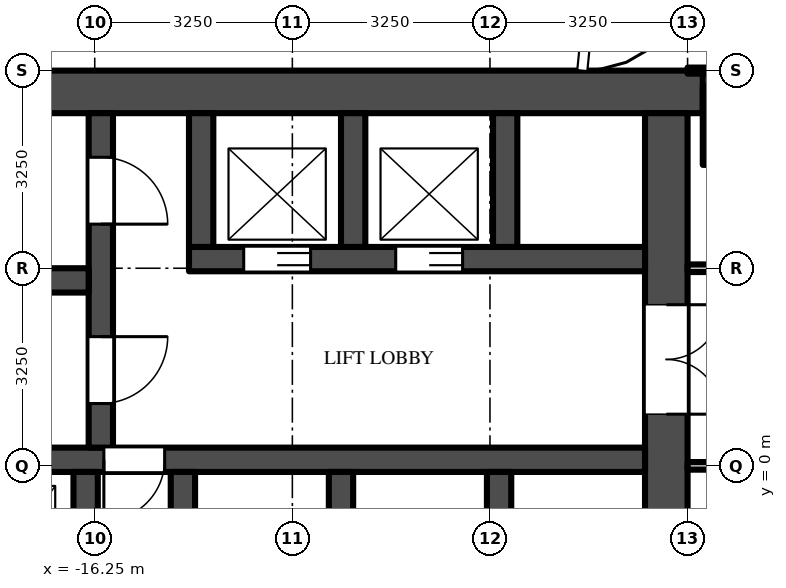
"""IFC4 building model, lengths in metres.
Left out: names, types, materials, properties, quantities, classifications, styles, units other than length and angle.
Written with IfcOpenShell. Run it as: python <this file> out.ifc"""

import sys

from ifc_helpers import new_model, si_unit, direction, frame, frame_2d, origin, origin_2d, place, context, subcontext, project, spatial, rectangle, extrude, source, transform, mapped, element, fill, save


model = new_model("IFC4")
c1 = context("Model", 3, precision=1e-05, world=origin(), true_north=direction((0.0, 1.0)))
c2 = subcontext(c1, "Body", "Model", "MODEL_VIEW")
j1 = project(units=[si_unit("LENGTHUNIT", "METRE"), si_unit("PLANEANGLEUNIT", "RADIAN")], contexts=[c1])
p1 = place(None, origin())
s1 = spatial("IfcSite", under=j1, at=p1, CompositionType="ELEMENT")
p2 = place(p1, origin())
s2 = spatial("IfcBuilding", under=s1, at=p2, CompositionType="ELEMENT")
p3 = place(p2, frame((0.0, 0.0, 106.5)))
s3 = spatial("IfcBuildingStorey", under=s2, at=p3, CompositionType="ELEMENT", Elevation=106.5)
m1 = source(origin(), c2, "Body", "SweptSolid", [
    extrude(rectangle(XDim=1.3, YDim=1.3, at=origin_2d()), origin(), (0.0, 0.0, 1.0), 4.5),
])
p4 = place(p3, frame((-5.6, 5.6, 0.0), z_axis=(0.0, 0.0, 1.0), x_axis=(1.0, 0.0, 0.0)))
e1 = element("IfcColumn", 1, at=p4, inside=s3, PredefinedType="COLUMN", context=c2, shape_type="MappedRepresentation", body=[
    mapped(m1, transform((0.0, 0.0, 0.0))),
])
m2 = source(origin(), c2, "Body", "SweptSolid", [
    extrude(rectangle(XDim=16.5, YDim=0.7, at=frame_2d((8.25, 0.0))), origin(), (0.0, 0.0, 1.0), 4.25),
])
p5 = place(p3, frame((-6.25, 6.15, 0.0), z_axis=(0.0, 0.0, 1.0), x_axis=(-1.0, 0.0, 0.0)))
e2 = element("IfcWall", 2, at=p5, inside=s3, PredefinedType="SHEAR", context=c2, shape_type="MappedRepresentation", body=[
    mapped(m2, transform((0.0, 0.0, 0.0))),
])
m3 = source(origin(), c2, "Body", "SweptSolid", [
    extrude(rectangle(XDim=9.05, YDim=0.7, at=frame_2d((4.525, 0.0))), origin(), (0.0, 0.0, 1.0), 4.25),
])
p6 = place(p3, frame((-6.85, 5.8, 0.0), z_axis=(0.0, 0.0, 1.0), x_axis=(0.0, -1.0, 0.0)))
e3 = element("IfcWall", 3, at=p6, inside=s3, PredefinedType="SHEAR", context=c2, shape_type="MappedRepresentation", body=[
    mapped(m3, transform((0.0, 0.0, 0.0))),
])
m4 = source(origin(), c2, "Body", "SweptSolid", [
    extrude(rectangle(XDim=1.8, YDim=2.1, at=frame_2d((0.9, 1.05))), frame((0.0, 0.36, 0.0), z_axis=(0.0, -1.0, 0.0), x_axis=(1.0, 0.0, 0.0)), (0.0, 0.0, 1.0), 0.72),
])
p7 = place(p6, frame((3.15, 0.0, 0.0)))
e4 = element("IfcOpeningElement", 4, at=p7, cuts=e3, PredefinedType="OPENING", context=c2, shape_type="MappedRepresentation", body=[
    mapped(m4, transform((0.0, 0.0, 0.0))),
])
m5 = source(origin(), c2, "Body", "SweptSolid", [
    extrude(rectangle(XDim=7.5, YDim=0.4, at=frame_2d((3.75, 0.0))), origin(), (0.0, 0.0, 1.0), 4.25),
])
p8 = place(p3, frame((-7.2, 3.4, 0.0), z_axis=(0.0, 0.0, 1.0), x_axis=(-1.0, 0.0, 0.0)))
e5 = element("IfcWall", 5, at=p8, inside=s3, PredefinedType="SHEAR", context=c2, shape_type="MappedRepresentation", body=[
    mapped(m5, transform((0.0, 0.0, 0.0))),
])
m6 = source(origin(), c2, "Body", "SweptSolid", [
    extrude(rectangle(XDim=1.1, YDim=2.1, at=frame_2d((0.55, 1.05))), frame((0.0, 0.21, 0.0), z_axis=(0.0, -1.0, 0.0), x_axis=(1.0, 0.0, 0.0)), (0.0, 0.0, 1.0), 0.42),
])
p9 = place(p8, frame((3.0, 0.0, 0.0)))
e6 = element("IfcOpeningElement", 6, at=p9, cuts=e5, PredefinedType="OPENING", context=c2, shape_type="MappedRepresentation", body=[
    mapped(m6, transform((0.0, 0.0, 0.0))),
])
p10 = place(p8, frame((5.5, 0.0, 0.0)))
e7 = element("IfcOpeningElement", 7, at=p10, cuts=e5, PredefinedType="OPENING", context=c2, shape_type="MappedRepresentation", body=[
    mapped(m6, transform((0.0, 0.0, 0.0))),
])
m7 = source(origin(), c2, "Body", "SweptSolid", [
    extrude(rectangle(XDim=14.85, YDim=0.4, at=frame_2d((7.425, 0.0))), origin(), (0.0, 0.0, 1.0), 4.25),
])
p11 = place(p3, frame((-7.2, 0.1, 0.0), z_axis=(0.0, 0.0, 1.0), x_axis=(-1.0, 0.0, 0.0)))
e8 = element("IfcWall", 8, at=p11, inside=s3, PredefinedType="SHEAR", context=c2, shape_type="MappedRepresentation", body=[
    mapped(m7, transform((0.0, 0.0, 0.0))),
])
m8 = source(origin(), c2, "Body", "SweptSolid", [
    extrude(rectangle(XDim=1.0, YDim=2.1, at=frame_2d((0.5, 1.05))), frame((0.0, 0.21, 0.0), z_axis=(0.0, -1.0, 0.0), x_axis=(1.0, 0.0, 0.0)), (0.0, 0.0, 1.0), 0.42),
])
p12 = place(p11, frame((7.9, 0.0, 0.0)))
e9 = element("IfcOpeningElement", 9, at=p12, cuts=e8, PredefinedType="OPENING", context=c2, shape_type="MappedRepresentation", body=[
    mapped(m8, transform((0.0, 0.0, 0.0))),
])
m9 = source(origin(), c2, "Body", "SweptSolid", [
    extrude(rectangle(XDim=5.5, YDim=0.4, at=frame_2d((2.75, 0.0))), origin(), (0.0, 0.0, 1.0), 4.25),
])
p13 = place(p3, frame((-16.15, 5.8, 0.0), z_axis=(0.0, 0.0, 1.0), x_axis=(0.0, -1.0, 0.0)))
e10 = element("IfcWall", 10, at=p13, inside=s3, PredefinedType="SHEAR", context=c2, shape_type="MappedRepresentation", body=[
    mapped(m9, transform((0.0, 0.0, 0.0))),
])
p14 = place(p13, frame((0.725, 0.0, 0.0)))
e11 = element("IfcOpeningElement", 11, at=p14, cuts=e10, PredefinedType="OPENING", context=c2, shape_type="MappedRepresentation", body=[
    mapped(m6, transform((0.0, 0.0, 0.0))),
])
p15 = place(p13, frame((3.675, 0.0, 0.0)))
e12 = element("IfcOpeningElement", 12, at=p15, cuts=e10, PredefinedType="OPENING", context=c2, shape_type="MappedRepresentation", body=[
    mapped(m6, transform((0.0, 0.0, 0.0))),
])
m10 = source(origin(), c2, "Body", "SweptSolid", [
    extrude(rectangle(XDim=5.7, YDim=0.4, at=frame_2d((2.85, 0.0))), origin(), (0.0, 0.0, 1.0), 4.25),
])
p16 = place(p3, frame((-16.35, 3.05, 0.0), z_axis=(0.0, 0.0, 1.0), x_axis=(-1.0, 0.0, 0.0)))
e13 = element("IfcWall", 13, at=p16, inside=s3, PredefinedType="SHEAR", context=c2, shape_type="MappedRepresentation", body=[
    mapped(m10, transform((0.0, 0.0, 0.0))),
])
m11 = source(origin(), c2, "Body", "SweptSolid", [
    extrude(rectangle(XDim=2.2, YDim=0.4, at=frame_2d((1.1, 0.0))), origin(), (0.0, 0.0, 1.0), 4.25),
])
for number, where, z_axis, x_axis in (
    (14, (-9.5, 5.8, 0.0), (0.0, 0.0, 1.0), (0.0, -1.0, 0.0)),
    (15, (-12.0, 5.8, 0.0), (0.0, 0.0, 1.0), (0.0, -1.0, 0.0)),
    (16, (-14.5, 5.8, 0.0), (0.0, 0.0, 1.0), (0.0, -1.0, 0.0)),
):
    element("IfcWall", number, at=place(p3, frame(where, z_axis=z_axis, x_axis=x_axis)), inside=s3, PredefinedType="SHEAR", context=c2, shape_type="MappedRepresentation", body=[
        mapped(m11, transform((0.0, 0.0, 0.0))),
    ])
m12 = source(origin(), c2, "Body", "SweptSolid", [
    extrude(rectangle(XDim=2.45, YDim=0.4, at=frame_2d((1.225, 0.0))), origin(), (0.0, 0.0, 1.0), 4.25),
])
for number, where, z_axis, x_axis in (
    (17, (-9.6, -0.1, 0.0), (0.0, 0.0, 1.0), (0.0, -1.0, 0.0)),
    (18, (-12.2, -0.1, 0.0), (0.0, 0.0, 1.0), (0.0, -1.0, 0.0)),
    (19, (-14.8, -0.1, 0.0), (0.0, 0.0, 1.0), (0.0, -1.0, 0.0)),
    (20, (-16.4, -0.1, 0.0), (0.0, 0.0, 1.0), (0.0, -1.0, 0.0)),
):
    element("IfcWall", number, at=place(p3, frame(where, z_axis=z_axis, x_axis=x_axis)), inside=s3, PredefinedType="SHEAR", context=c2, shape_type="MappedRepresentation", body=[
        mapped(m12, transform((0.0, 0.0, 0.0))),
    ])
m13 = source(origin(), c2, "Body", "SweptSolid", [
    extrude(rectangle(XDim=5.363, YDim=0.125, at=frame_2d((2.681, 0.0))), origin(), (0.0, 0.0, 1.0), 3.468),
])
p17 = place(p3, frame((-1.137, 0.0, 0.0), z_axis=(0.0, 0.0, 1.0), x_axis=(-1.0, 0.0, 0.0)))
e21 = element("IfcWall", 21, at=p17, inside=s3, PredefinedType="PARTITIONING", context=c2, shape_type="MappedRepresentation", body=[
    mapped(m13, transform((0.0, 0.0, 0.0))),
])
p18 = place(p3, frame((-6.5, 3.25, 0.0), z_axis=(0.0, 0.0, 1.0), x_axis=(1.0, 0.0, 0.0)))
e22 = element("IfcWall", 22, at=p18, inside=s3, PredefinedType="PARTITIONING", context=c2, shape_type="MappedRepresentation", body=[
    mapped(m13, transform((0.0, 0.0, 0.0))),
])
m14 = source(origin(), c2, "Body", "SweptSolid", [
    extrude(rectangle(XDim=1.0, YDim=2.1, at=frame_2d((0.5, 1.05))), frame((0.0, 0.073, 0.0), z_axis=(0.0, -1.0, 0.0), x_axis=(1.0, 0.0, 0.0)), (0.0, 0.0, 1.0), 0.145),
])
p19 = place(p18, frame((3.95, 0.0, 0.0)))
e23 = element("IfcOpeningElement", 23, at=p19, cuts=e22, PredefinedType="OPENING", context=c2, shape_type="MappedRepresentation", body=[
    mapped(m14, transform((0.0, 0.0, 0.0))),
])
m15 = source(origin(), c2, "Body", "SweptSolid", [
    extrude(rectangle(XDim=5.363, YDim=0.1, at=frame_2d((2.681, 0.0))), origin(), (0.0, 0.0, 1.0), 3.33),
])
p20 = place(p3, frame((-6.5, 6.5, 0.0), z_axis=(0.0, 0.0, 1.0), x_axis=(1.0, 0.0, 0.0)))
e24 = element("IfcWall", 24, at=p20, inside=s3, PredefinedType="PARTITIONING", context=c2, shape_type="MappedRepresentation", body=[
    mapped(m15, transform((0.0, 0.0, 0.0))),
])
m16 = source(origin(), c2, "Body", "SweptSolid", [
    extrude(rectangle(XDim=1.1, YDim=2.1, at=frame_2d((0.55, 1.05))), frame((0.0, 0.025, 0.0), z_axis=(0.0, -1.0, 0.0), x_axis=(1.0, 0.0, 0.0)), (0.0, 0.0, 1.0), 0.05),
])
p21 = place(p9, origin())
e25 = element("IfcDoor", 25, at=p21, inside=s3, OperationType="DOUBLE_DOOR_SLIDING", PredefinedType="DOOR", context=c2, shape_type="MappedRepresentation", body=[
    mapped(m16, transform((0.0, 0.0, 0.0))),
])
fill(e6, e25)
p22 = place(p10, origin())
e26 = element("IfcDoor", 26, at=p22, inside=s3, OperationType="DOUBLE_DOOR_SLIDING", PredefinedType="DOOR", context=c2, shape_type="MappedRepresentation", body=[
    mapped(m16, transform((0.0, 0.0, 0.0))),
])
fill(e7, e26)
m17 = source(origin(), c2, "Body", "SweptSolid", [
    extrude(rectangle(XDim=1.8, YDim=2.1, at=frame_2d((0.9, 1.05))), frame((0.0, -0.275, 0.0), z_axis=(0.0, -1.0, 0.0), x_axis=(1.0, 0.0, 0.0)), (0.0, 0.0, 1.0), 0.05),
])
p23 = place(p7, origin())
e27 = element("IfcDoor", 27, at=p23, inside=s3, OperationType="DOUBLE_DOOR_SINGLE_SWING", PredefinedType="DOOR", context=c2, shape_type="MappedRepresentation", body=[
    mapped(m17, transform((0.0, 0.0, 0.0))),
])
fill(e4, e27)
p24 = place(p14, origin())
e28 = element("IfcDoor", 28, at=p24, inside=s3, OperationType="SINGLE_SWING_RIGHT", PredefinedType="DOOR", context=c2, shape_type="MappedRepresentation", body=[
    mapped(m16, transform((0.0, 0.0, 0.0))),
])
fill(e11, e28)
p25 = place(p15, origin())
e29 = element("IfcDoor", 29, at=p25, inside=s3, OperationType="SINGLE_SWING_LEFT", PredefinedType="DOOR", context=c2, shape_type="MappedRepresentation", body=[
    mapped(m16, transform((0.0, 0.0, 0.0))),
])
fill(e12, e29)
m18 = source(origin(), c2, "Body", "SweptSolid", [
    extrude(rectangle(XDim=1.0, YDim=2.1, at=frame_2d((0.5, 1.05))), frame((0.0, 0.025, 0.0), z_axis=(0.0, -1.0, 0.0), x_axis=(1.0, 0.0, 0.0)), (0.0, 0.0, 1.0), 0.05),
])
p26 = place(p12, origin())
e30 = element("IfcDoor", 30, at=p26, inside=s3, OperationType="SINGLE_SWING_RIGHT", PredefinedType="DOOR", context=c2, shape_type="MappedRepresentation", body=[
    mapped(m18, transform((0.0, 0.0, 0.0))),
])
fill(e9, e30)
save(model, sys.argv[1])
